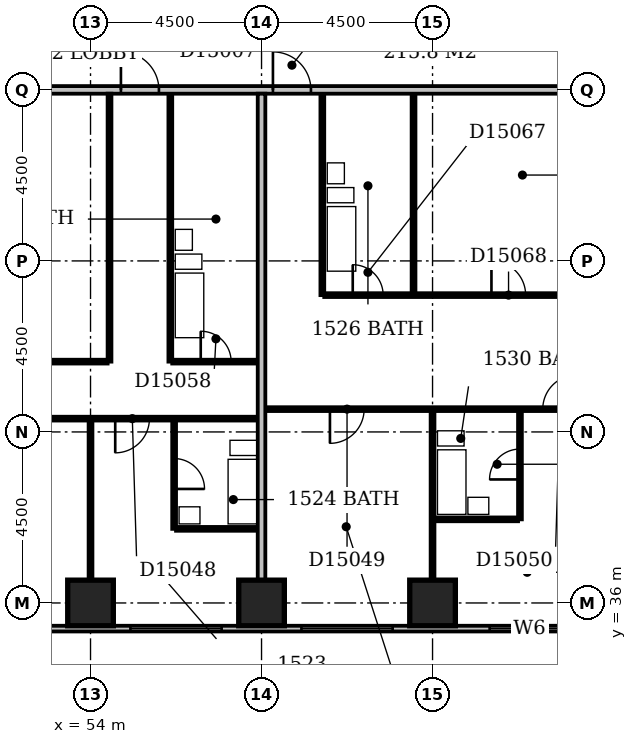
"""IFC4 building model, lengths in metres.
Left out: names, types, materials, properties, quantities, classifications, styles, units other than length and angle.
Written with IfcOpenShell. Run it as: python <this file> out.ifc"""

import sys

from ifc_helpers import new_model, si_unit, direction, frame, frame_2d, origin, origin_2d, place, context, subcontext, project, spatial, rectangle, extrude, element, fill, save


model = new_model("IFC4")
c1 = context("Model", 3, precision=1e-05, world=origin(), true_north=direction((0.0, 1.0)))
c2 = subcontext(c1, "Body", "Model", "MODEL_VIEW")
j1 = project(units=[si_unit("LENGTHUNIT", "METRE"), si_unit("PLANEANGLEUNIT", "RADIAN")], contexts=[c1])
p1 = place(None, origin())
s1 = spatial("IfcSite", under=j1, at=p1, CompositionType="ELEMENT")
p2 = place(p1, origin())
s2 = spatial("IfcBuilding", under=s1, at=p2, CompositionType="ELEMENT")
p3 = place(p2, frame((0.0, 0.0, 65.0)))
s3 = spatial("IfcBuildingStorey", under=s2, at=p3, CompositionType="ELEMENT", Elevation=65.0)
for number, where, z_axis, x_axis in (
    (1, (54.0, 36.0, -0.3), (0.0, 0.0, 1.0), (1.0, 0.0, 0.0)),
    (2, (58.5, 36.0, -0.3), (0.0, 0.0, 1.0), (1.0, 0.0, 0.0)),
    (3, (63.0, 36.0, -0.3), (0.0, 0.0, 1.0), (1.0, 0.0, 0.0)),
):
    element("IfcColumn", number, at=place(p3, frame(where, z_axis=z_axis, x_axis=x_axis)), inside=s3, PredefinedType="COLUMN", context=c2, shape_type="SweptSolid", body=[
        extrude(rectangle(XDim=1.2, YDim=1.2, at=origin_2d()), origin(), (0.0, 0.0, 1.0), 3.6),
    ])
p4 = place(p3, frame((23.1, 35.325, 0.0), z_axis=(0.0, 0.0, 1.0), x_axis=(1.0, 0.0, 0.0)))
e4 = element("IfcWall", 4, at=p4, inside=s3, PredefinedType="STANDARD", context=c2, shape_type="SweptSolid", body=[
    extrude(rectangle(XDim=45.15, YDim=0.15, at=frame_2d((22.575, 0.0))), origin(), (0.0, 0.0, 1.0), 2.7),
])
p5 = place(p4, frame((0.45, 0.0, 0.6)))
e5 = element("IfcOpeningElement", 5, at=p5, cuts=e4, PredefinedType="OPENING", context=c2, shape_type="SweptSolid", body=[
    extrude(rectangle(XDim=2.4, YDim=1.8, at=frame_2d((1.2, 0.9))), frame((0.0, 0.087, 0.0), z_axis=(0.0, -1.0, 0.0), x_axis=(1.0, 0.0, 0.0)), (0.0, 0.0, 1.0), 0.174),
])
p6 = place(p4, frame((4.95, 0.0, 0.6)))
e6 = element("IfcOpeningElement", 6, at=p6, cuts=e4, PredefinedType="OPENING", context=c2, shape_type="SweptSolid", body=[
    extrude(rectangle(XDim=2.4, YDim=1.8, at=frame_2d((1.2, 0.9))), frame((0.0, 0.087, 0.0), z_axis=(0.0, -1.0, 0.0), x_axis=(1.0, 0.0, 0.0)), (0.0, 0.0, 1.0), 0.174),
])
p7 = place(p4, frame((10.877, 0.0, 0.6)))
e7 = element("IfcOpeningElement", 7, at=p7, cuts=e4, PredefinedType="OPENING", context=c2, shape_type="SweptSolid", body=[
    extrude(rectangle(XDim=1.2, YDim=1.8, at=frame_2d((0.6, 0.9))), frame((0.0, 0.087, 0.0), z_axis=(0.0, -1.0, 0.0), x_axis=(1.0, 0.0, 0.0)), (0.0, 0.0, 1.0), 0.174),
])
p8 = place(p4, frame((13.823, 0.0, 0.6)))
e8 = element("IfcOpeningElement", 8, at=p8, cuts=e4, PredefinedType="OPENING", context=c2, shape_type="SweptSolid", body=[
    extrude(rectangle(XDim=1.2, YDim=1.8, at=frame_2d((0.6, 0.9))), frame((0.0, 0.087, 0.0), z_axis=(0.0, -1.0, 0.0), x_axis=(1.0, 0.0, 0.0)), (0.0, 0.0, 1.0), 0.174),
])
p9 = place(p4, frame((18.45, 0.0, 0.6)))
e9 = element("IfcOpeningElement", 9, at=p9, cuts=e4, PredefinedType="OPENING", context=c2, shape_type="SweptSolid", body=[
    extrude(rectangle(XDim=2.4, YDim=1.8, at=frame_2d((1.2, 0.9))), frame((0.0, 0.087, 0.0), z_axis=(0.0, -1.0, 0.0), x_axis=(1.0, 0.0, 0.0)), (0.0, 0.0, 1.0), 0.174),
])
p10 = place(p4, frame((22.95, 0.0, 0.6)))
e10 = element("IfcOpeningElement", 10, at=p10, cuts=e4, PredefinedType="OPENING", context=c2, shape_type="SweptSolid", body=[
    extrude(rectangle(XDim=2.4, YDim=1.8, at=frame_2d((1.2, 0.9))), frame((0.0, 0.087, 0.0), z_axis=(0.0, -1.0, 0.0), x_axis=(1.0, 0.0, 0.0)), (0.0, 0.0, 1.0), 0.174),
])
p11 = place(p4, frame((27.45, 0.0, 0.6)))
e11 = element("IfcOpeningElement", 11, at=p11, cuts=e4, PredefinedType="OPENING", context=c2, shape_type="SweptSolid", body=[
    extrude(rectangle(XDim=2.4, YDim=1.8, at=frame_2d((1.2, 0.9))), frame((0.0, 0.087, 0.0), z_axis=(0.0, -1.0, 0.0), x_axis=(1.0, 0.0, 0.0)), (0.0, 0.0, 1.0), 0.174),
])
p12 = place(p4, frame((31.95, 0.0, 0.6)))
e12 = element("IfcOpeningElement", 12, at=p12, cuts=e4, PredefinedType="OPENING", context=c2, shape_type="SweptSolid", body=[
    extrude(rectangle(XDim=2.4, YDim=1.8, at=frame_2d((1.2, 0.9))), frame((0.0, 0.087, 0.0), z_axis=(0.0, -1.0, 0.0), x_axis=(1.0, 0.0, 0.0)), (0.0, 0.0, 1.0), 0.174),
])
p13 = place(p4, frame((36.45, 0.0, 0.6)))
e13 = element("IfcOpeningElement", 13, at=p13, cuts=e4, PredefinedType="OPENING", context=c2, shape_type="SweptSolid", body=[
    extrude(rectangle(XDim=2.4, YDim=1.8, at=frame_2d((1.2, 0.9))), frame((0.0, 0.087, 0.0), z_axis=(0.0, -1.0, 0.0), x_axis=(1.0, 0.0, 0.0)), (0.0, 0.0, 1.0), 0.174),
])
p14 = place(p4, frame((41.403, 0.0, 0.6)))
e14 = element("IfcOpeningElement", 14, at=p14, cuts=e4, PredefinedType="OPENING", context=c2, shape_type="SweptSolid", body=[
    extrude(rectangle(XDim=2.1, YDim=1.8, at=frame_2d((1.05, 0.9))), frame((0.0, 0.087, 0.0), z_axis=(0.0, -1.0, 0.0), x_axis=(1.0, 0.0, 0.0)), (0.0, 0.0, 1.0), 0.174),
])
p15 = place(p3, frame((54.0, 36.6, 0.0), z_axis=(0.0, 0.0, 1.0), x_axis=(0.0, 1.0, 0.0)))
e15 = element("IfcWall", 15, at=p15, inside=s3, PredefinedType="PARTITIONING", context=c2, shape_type="SweptSolid", body=[
    extrude(rectangle(XDim=4.2, YDim=0.1, at=frame_2d((2.1, 0.0))), origin(), (0.0, 0.0, 1.0), 2.6),
])
p16 = place(p3, frame((58.5, 36.6, 0.0), z_axis=(0.0, 0.0, 1.0), x_axis=(0.0, 1.0, 0.0)))
e16 = element("IfcWall", 16, at=p16, inside=s3, PredefinedType="PARTITIONING", context=c2, shape_type="SweptSolid", body=[
    extrude(rectangle(XDim=12.8, YDim=0.2, at=frame_2d((6.4, 0.0))), origin(), (0.0, 0.0, 1.0), 3.3),
])
p17 = place(p3, frame((63.0, 36.6, 0.0), z_axis=(0.0, 0.0, 1.0), x_axis=(0.0, 1.0, 0.0)))
e17 = element("IfcWall", 17, at=p17, inside=s3, PredefinedType="PARTITIONING", context=c2, shape_type="SweptSolid", body=[
    extrude(rectangle(XDim=4.45, YDim=0.1, at=frame_2d((2.225, 0.0))), origin(), (0.0, 0.0, 1.0), 2.4),
])
p18 = place(p3, frame((56.2, 37.95, 0.0), z_axis=(0.0, 0.0, 1.0), x_axis=(0.0, 1.0, 0.0)))
e18 = element("IfcWall", 18, at=p18, inside=s3, PredefinedType="PLUMBINGWALL", context=c2, shape_type="SweptSolid", body=[
    extrude(rectangle(XDim=2.85, YDim=0.1, at=frame_2d((1.425, 0.0))), origin(), (0.0, 0.0, 1.0), 3.3),
])
p19 = place(p18, frame((1.05, 0.0, 0.0)))
e19 = element("IfcOpeningElement", 19, at=p19, cuts=e18, PredefinedType="OPENING", context=c2, shape_type="SweptSolid", body=[
    extrude(rectangle(XDim=0.8, YDim=2.1, at=frame_2d((0.4, 1.05))), frame((0.0, 0.062, 0.0), z_axis=(0.0, -1.0, 0.0), x_axis=(1.0, 0.0, 0.0)), (0.0, 0.0, 1.0), 0.124),
])
p20 = place(p3, frame((56.25, 37.95, 0.0), z_axis=(0.0, 0.0, 1.0), x_axis=(1.0, 0.0, 0.0)))
e20 = element("IfcWall", 20, at=p20, inside=s3, PredefinedType="PLUMBINGWALL", context=c2, shape_type="SweptSolid", body=[
    extrude(rectangle(XDim=2.15, YDim=0.1, at=frame_2d((1.075, 0.0))), origin(), (0.0, 0.0, 1.0), 3.3),
])
p21 = place(p3, frame((63.05, 38.2, 0.0), z_axis=(0.0, 0.0, 1.0), x_axis=(1.0, 0.0, 0.0)))
e21 = element("IfcWall", 21, at=p21, inside=s3, PredefinedType="PLUMBINGWALL", context=c2, shape_type="SweptSolid", body=[
    extrude(rectangle(XDim=2.2, YDim=0.1, at=frame_2d((1.1, 0.0))), origin(), (0.0, 0.0, 1.0), 3.3),
])
p22 = place(p3, frame((65.3, 38.2, 0.0), z_axis=(0.0, 0.0, 1.0), x_axis=(0.0, 1.0, 0.0)))
e22 = element("IfcWall", 22, at=p22, inside=s3, PredefinedType="PLUMBINGWALL", context=c2, shape_type="SweptSolid", body=[
    extrude(rectangle(XDim=2.85, YDim=0.1, at=frame_2d((1.425, 0.0))), origin(), (0.0, 0.0, 1.0), 3.3),
])
p23 = place(p22, frame((1.05, 0.0, 0.0)))
e23 = element("IfcOpeningElement", 23, at=p23, cuts=e22, PredefinedType="OPENING", context=c2, shape_type="SweptSolid", body=[
    extrude(rectangle(XDim=0.8, YDim=2.1, at=frame_2d((0.4, 1.05))), frame((0.0, 0.062, 0.0), z_axis=(0.0, -1.0, 0.0), x_axis=(1.0, 0.0, 0.0)), (0.0, 0.0, 1.0), 0.124),
])
p24 = place(p3, frame((49.6, 40.85, 0.0), z_axis=(0.0, 0.0, 1.0), x_axis=(1.0, 0.0, 0.0)))
e24 = element("IfcWall", 24, at=p24, inside=s3, PredefinedType="PARTITIONING", context=c2, shape_type="SweptSolid", body=[
    extrude(rectangle(XDim=8.8, YDim=0.1, at=frame_2d((4.4, 0.0))), origin(), (0.0, 0.0, 1.0), 3.3),
])
p25 = place(p24, frame((1.7, 0.0, 0.0)))
e25 = element("IfcOpeningElement", 25, at=p25, cuts=e24, PredefinedType="OPENING", context=c2, shape_type="SweptSolid", body=[
    extrude(rectangle(XDim=0.9, YDim=2.1, at=frame_2d((0.45, 1.05))), frame((0.0, 0.062, 0.0), z_axis=(0.0, -1.0, 0.0), x_axis=(1.0, 0.0, 0.0)), (0.0, 0.0, 1.0), 0.124),
])
p26 = place(p24, frame((5.05, 0.0, 0.0)))
e26 = element("IfcOpeningElement", 26, at=p26, cuts=e24, PredefinedType="OPENING", context=c2, shape_type="SweptSolid", body=[
    extrude(rectangle(XDim=0.9, YDim=2.1, at=frame_2d((0.45, 1.05))), frame((0.0, 0.062, 0.0), z_axis=(0.0, -1.0, 0.0), x_axis=(1.0, 0.0, 0.0)), (0.0, 0.0, 1.0), 0.124),
])
p27 = place(p3, frame((58.6, 41.1, 0.0), z_axis=(0.0, 0.0, 1.0), x_axis=(1.0, 0.0, 0.0)))
e27 = element("IfcWall", 27, at=p27, inside=s3, PredefinedType="PARTITIONING", context=c2, shape_type="SweptSolid", body=[
    extrude(rectangle(XDim=8.3, YDim=0.1, at=frame_2d((4.15, 0.0))), origin(), (0.0, 0.0, 1.0), 3.3),
])
p28 = place(p27, frame((1.7, 0.0, 0.0)))
e28 = element("IfcOpeningElement", 28, at=p28, cuts=e27, PredefinedType="OPENING", context=c2, shape_type="SweptSolid", body=[
    extrude(rectangle(XDim=0.9, YDim=2.1, at=frame_2d((0.45, 1.05))), frame((0.0, 0.062, 0.0), z_axis=(0.0, -1.0, 0.0), x_axis=(1.0, 0.0, 0.0)), (0.0, 0.0, 1.0), 0.124),
])
p29 = place(p27, frame((7.3, 0.0, 0.0)))
e29 = element("IfcOpeningElement", 29, at=p29, cuts=e27, PredefinedType="OPENING", context=c2, shape_type="SweptSolid", body=[
    extrude(rectangle(XDim=0.9, YDim=2.1, at=frame_2d((0.45, 1.05))), frame((0.0, 0.062, 0.0), z_axis=(0.0, -1.0, 0.0), x_axis=(1.0, 0.0, 0.0)), (0.0, 0.0, 1.0), 0.124),
])
p30 = place(p3, frame((49.6, 42.35, 0.0), z_axis=(0.0, 0.0, 1.0), x_axis=(1.0, 0.0, 0.0)))
e30 = element("IfcWall", 30, at=p30, inside=s3, PredefinedType="PARTITIONING", context=c2, shape_type="SweptSolid", body=[
    extrude(rectangle(XDim=4.85, YDim=0.1, at=frame_2d((2.425, 0.0))), origin(), (0.0, 0.0, 1.0), 3.3),
])
p31 = place(p30, frame((1.95, 0.0, 0.0)))
e31 = element("IfcOpeningElement", 31, at=p31, cuts=e30, PredefinedType="OPENING", context=c2, shape_type="SweptSolid", body=[
    extrude(rectangle(XDim=0.9, YDim=2.1, at=frame_2d((0.45, 1.05))), frame((0.0, 0.062, 0.0), z_axis=(0.0, -1.0, 0.0), x_axis=(1.0, 0.0, 0.0)), (0.0, 0.0, 1.0), 0.124),
])
p32 = place(p3, frame((54.5, 42.35, 0.0), z_axis=(0.0, 0.0, 1.0), x_axis=(0.0, 1.0, 0.0)))
e32 = element("IfcWall", 32, at=p32, inside=s3, PredefinedType="PARTITIONING", context=c2, shape_type="SweptSolid", body=[
    extrude(rectangle(XDim=7.05, YDim=0.1, at=frame_2d((3.525, 0.0))), origin(), (0.0, 0.0, 1.0), 2.6),
])
p33 = place(p3, frame((56.1, 42.35, 0.0), z_axis=(0.0, 0.0, 1.0), x_axis=(0.0, 1.0, 0.0)))
e33 = element("IfcWall", 33, at=p33, inside=s3, PredefinedType="PLUMBINGWALL", context=c2, shape_type="SweptSolid", body=[
    extrude(rectangle(XDim=7.05, YDim=0.1, at=frame_2d((3.525, 0.0))), origin(), (0.0, 0.0, 1.0), 3.3),
])
p34 = place(p3, frame((56.15, 42.35, 0.0), z_axis=(0.0, 0.0, 1.0), x_axis=(1.0, 0.0, 0.0)))
e34 = element("IfcWall", 34, at=p34, inside=s3, PredefinedType="PARTITIONING", context=c2, shape_type="SweptSolid", body=[
    extrude(rectangle(XDim=2.25, YDim=0.1, at=frame_2d((1.125, 0.0))), origin(), (0.0, 0.0, 1.0), 3.3),
])
p35 = place(p34, frame((0.75, 0.0, 0.0)))
e35 = element("IfcOpeningElement", 35, at=p35, cuts=e34, PredefinedType="OPENING", context=c2, shape_type="SweptSolid", body=[
    extrude(rectangle(XDim=0.8, YDim=2.1, at=frame_2d((0.4, 1.05))), frame((0.0, 0.062, 0.0), z_axis=(0.0, -1.0, 0.0), x_axis=(1.0, 0.0, 0.0)), (0.0, 0.0, 1.0), 0.124),
])
p36 = place(p3, frame((60.1, 44.1, 0.0), z_axis=(0.0, 0.0, 1.0), x_axis=(0.0, 1.0, 0.0)))
e36 = element("IfcWall", 36, at=p36, inside=s3, PredefinedType="PLUMBINGWALL", context=c2, shape_type="SweptSolid", body=[
    extrude(rectangle(XDim=5.3, YDim=0.1, at=frame_2d((2.65, 0.0))), origin(), (0.0, 0.0, 1.0), 3.3),
])
p37 = place(p3, frame((60.15, 44.1, 0.0), z_axis=(0.0, 0.0, 1.0), x_axis=(1.0, 0.0, 0.0)))
e37 = element("IfcWall", 37, at=p37, inside=s3, PredefinedType="PARTITIONING", context=c2, shape_type="SweptSolid", body=[
    extrude(rectangle(XDim=7.95, YDim=0.1, at=frame_2d((3.975, 0.0))), origin(), (0.0, 0.0, 1.0), 3.3),
])
p38 = place(p37, frame((0.75, 0.0, 0.0)))
e38 = element("IfcOpeningElement", 38, at=p38, cuts=e37, PredefinedType="OPENING", context=c2, shape_type="SweptSolid", body=[
    extrude(rectangle(XDim=0.8, YDim=2.1, at=frame_2d((0.4, 1.05))), frame((0.0, 0.062, 0.0), z_axis=(0.0, -1.0, 0.0), x_axis=(1.0, 0.0, 0.0)), (0.0, 0.0, 1.0), 0.124),
])
p39 = place(p37, frame((4.4, 0.0, 0.0)))
e39 = element("IfcOpeningElement", 39, at=p39, cuts=e37, PredefinedType="OPENING", context=c2, shape_type="SweptSolid", body=[
    extrude(rectangle(XDim=0.9, YDim=2.1, at=frame_2d((0.45, 1.05))), frame((0.0, 0.062, 0.0), z_axis=(0.0, -1.0, 0.0), x_axis=(1.0, 0.0, 0.0)), (0.0, 0.0, 1.0), 0.124),
])
p40 = place(p3, frame((62.5, 44.15, 0.0), z_axis=(0.0, 0.0, 1.0), x_axis=(0.0, 1.0, 0.0)))
e40 = element("IfcWall", 40, at=p40, inside=s3, PredefinedType="PLUMBINGWALL", context=c2, shape_type="SweptSolid", body=[
    extrude(rectangle(XDim=5.25, YDim=0.1, at=frame_2d((2.625, 0.0))), origin(), (0.0, 0.0, 1.0), 2.4),
])
p41 = place(p3, frame((9.1, 49.5, 0.0), z_axis=(0.0, 0.0, 1.0), x_axis=(1.0, 0.0, 0.0)))
e41 = element("IfcWall", 41, at=p41, inside=s3, PredefinedType="PARTITIONING", context=c2, shape_type="SweptSolid", body=[
    extrude(rectangle(XDim=57.8, YDim=0.2, at=frame_2d((28.9, 0.0))), origin(), (0.0, 0.0, 1.0), 3.3),
])
p42 = place(p41, frame((13.7, 0.0, 0.0)))
e42 = element("IfcOpeningElement", 42, at=p42, cuts=e41, PredefinedType="OPENING", context=c2, shape_type="SweptSolid", body=[
    extrude(rectangle(XDim=1.0, YDim=2.1, at=frame_2d((0.5, 1.05))), frame((0.0, 0.112, 0.0), z_axis=(0.0, -1.0, 0.0), x_axis=(1.0, 0.0, 0.0)), (0.0, 0.0, 1.0), 0.224),
])
p43 = place(p41, frame((32.2, 0.0, 0.0)))
e43 = element("IfcOpeningElement", 43, at=p43, cuts=e41, PredefinedType="OPENING", context=c2, shape_type="SweptSolid", body=[
    extrude(rectangle(XDim=1.0, YDim=2.1, at=frame_2d((0.5, 1.05))), frame((0.0, 0.112, 0.0), z_axis=(0.0, -1.0, 0.0), x_axis=(1.0, 0.0, 0.0)), (0.0, 0.0, 1.0), 0.224),
])
p44 = place(p41, frame((37.85, 0.0, 0.0)))
e44 = element("IfcOpeningElement", 44, at=p44, cuts=e41, PredefinedType="OPENING", context=c2, shape_type="SweptSolid", body=[
    extrude(rectangle(XDim=1.0, YDim=2.1, at=frame_2d((0.5, 1.05))), frame((0.0, 0.112, 0.0), z_axis=(0.0, -1.0, 0.0), x_axis=(1.0, 0.0, 0.0)), (0.0, 0.0, 1.0), 0.224),
])
p45 = place(p41, frame((45.7, 0.0, 0.0)))
e45 = element("IfcOpeningElement", 45, at=p45, cuts=e41, PredefinedType="OPENING", context=c2, shape_type="SweptSolid", body=[
    extrude(rectangle(XDim=1.0, YDim=2.1, at=frame_2d((0.5, 1.05))), frame((0.0, 0.112, 0.0), z_axis=(0.0, -1.0, 0.0), x_axis=(1.0, 0.0, 0.0)), (0.0, 0.0, 1.0), 0.224),
])
p46 = place(p41, frame((49.7, 0.0, 0.0)))
e46 = element("IfcOpeningElement", 46, at=p46, cuts=e41, PredefinedType="OPENING", context=c2, shape_type="SweptSolid", body=[
    extrude(rectangle(XDim=1.0, YDim=2.1, at=frame_2d((0.5, 1.05))), frame((0.0, 0.112, 0.0), z_axis=(0.0, -1.0, 0.0), x_axis=(1.0, 0.0, 0.0)), (0.0, 0.0, 1.0), 0.224),
])
p47 = place(p41, frame((8.4, 0.0, 0.0)))
e47 = element("IfcOpeningElement", 47, at=p47, cuts=e41, PredefinedType="OPENING", context=c2, shape_type="SweptSolid", body=[
    extrude(rectangle(XDim=0.9, YDim=2.1, at=frame_2d((0.45, 1.05))), frame((0.0, 0.112, 0.0), z_axis=(0.0, -1.0, 0.0), x_axis=(1.0, 0.0, 0.0)), (0.0, 0.0, 1.0), 0.224),
])
p48 = place(p12, origin())
e48 = element("IfcWindow", 48, at=p48, inside=s3, PartitioningType="SINGLE_PANEL", PredefinedType="WINDOW", context=c2, shape_type="SweptSolid", body=[
    extrude(rectangle(XDim=2.4, YDim=1.8, at=frame_2d((1.2, 0.9))), frame((0.0, 0.03, 0.0), z_axis=(0.0, -1.0, 0.0), x_axis=(1.0, 0.0, 0.0)), (0.0, 0.0, 1.0), 0.06),
])
fill(e12, e48)
p49 = place(p13, origin())
e49 = element("IfcWindow", 49, at=p49, inside=s3, PartitioningType="SINGLE_PANEL", PredefinedType="WINDOW", context=c2, shape_type="SweptSolid", body=[
    extrude(rectangle(XDim=2.4, YDim=1.8, at=frame_2d((1.2, 0.9))), frame((0.0, 0.03, 0.0), z_axis=(0.0, -1.0, 0.0), x_axis=(1.0, 0.0, 0.0)), (0.0, 0.0, 1.0), 0.06),
])
fill(e13, e49)
p50 = place(p14, origin())
e50 = element("IfcWindow", 50, at=p50, inside=s3, PartitioningType="SINGLE_PANEL", PredefinedType="WINDOW", context=c2, shape_type="SweptSolid", body=[
    extrude(rectangle(XDim=2.1, YDim=1.8, at=frame_2d((1.05, 0.9))), frame((0.0, 0.03, 0.0), z_axis=(0.0, -1.0, 0.0), x_axis=(1.0, 0.0, 0.0)), (0.0, 0.0, 1.0), 0.06),
])
fill(e14, e50)
p51 = place(p19, frame((0.8, 0.0, 0.0), z_axis=(0.0, 0.0, 1.0), x_axis=(-1.0, 0.0, 0.0)))
e51 = element("IfcDoor", 51, at=p51, inside=s3, OperationType="SINGLE_SWING_RIGHT", PredefinedType="DOOR", context=c2, shape_type="SweptSolid", body=[
    extrude(rectangle(XDim=0.8, YDim=2.1, at=frame_2d((0.4, 1.05))), frame((0.0, 0.025, 0.0), z_axis=(0.0, -1.0, 0.0), x_axis=(1.0, 0.0, 0.0)), (0.0, 0.0, 1.0), 0.05),
])
fill(e19, e51)
p52 = place(p23, origin())
e52 = element("IfcDoor", 52, at=p52, inside=s3, OperationType="SINGLE_SWING_LEFT", PredefinedType="DOOR", context=c2, shape_type="SweptSolid", body=[
    extrude(rectangle(XDim=0.8, YDim=2.1, at=frame_2d((0.4, 1.05))), frame((0.0, 0.025, 0.0), z_axis=(0.0, -1.0, 0.0), x_axis=(1.0, 0.0, 0.0)), (0.0, 0.0, 1.0), 0.05),
])
fill(e23, e52)
p53 = place(p26, frame((0.9, 0.0, 0.0), z_axis=(0.0, 0.0, 1.0), x_axis=(-1.0, 0.0, 0.0)))
e53 = element("IfcDoor", 53, at=p53, inside=s3, OperationType="SINGLE_SWING_RIGHT", PredefinedType="DOOR", context=c2, shape_type="SweptSolid", body=[
    extrude(rectangle(XDim=0.9, YDim=2.1, at=frame_2d((0.45, 1.05))), frame((0.0, 0.025, 0.0), z_axis=(0.0, -1.0, 0.0), x_axis=(1.0, 0.0, 0.0)), (0.0, 0.0, 1.0), 0.05),
])
fill(e26, e53)
p54 = place(p28, frame((0.9, 0.0, 0.0), z_axis=(0.0, 0.0, 1.0), x_axis=(-1.0, 0.0, 0.0)))
e54 = element("IfcDoor", 54, at=p54, inside=s3, OperationType="SINGLE_SWING_RIGHT", PredefinedType="DOOR", context=c2, shape_type="SweptSolid", body=[
    extrude(rectangle(XDim=0.9, YDim=2.1, at=frame_2d((0.45, 1.05))), frame((0.0, 0.025, 0.0), z_axis=(0.0, -1.0, 0.0), x_axis=(1.0, 0.0, 0.0)), (0.0, 0.0, 1.0), 0.05),
])
fill(e28, e54)
p55 = place(p29, frame((0.9, 0.0, 0.0), z_axis=(0.0, 0.0, 1.0), x_axis=(-1.0, 0.0, 0.0)))
e55 = element("IfcDoor", 55, at=p55, inside=s3, OperationType="SINGLE_SWING_LEFT", PredefinedType="DOOR", context=c2, shape_type="SweptSolid", body=[
    extrude(rectangle(XDim=0.9, YDim=2.1, at=frame_2d((0.45, 1.05))), frame((0.0, 0.025, 0.0), z_axis=(0.0, -1.0, 0.0), x_axis=(1.0, 0.0, 0.0)), (0.0, 0.0, 1.0), 0.05),
])
fill(e29, e55)
p56 = place(p35, origin())
e56 = element("IfcDoor", 56, at=p56, inside=s3, OperationType="SINGLE_SWING_LEFT", PredefinedType="DOOR", context=c2, shape_type="SweptSolid", body=[
    extrude(rectangle(XDim=0.8, YDim=2.1, at=frame_2d((0.4, 1.05))), frame((0.0, 0.025, 0.0), z_axis=(0.0, -1.0, 0.0), x_axis=(1.0, 0.0, 0.0)), (0.0, 0.0, 1.0), 0.05),
])
fill(e35, e56)
p57 = place(p38, origin())
e57 = element("IfcDoor", 57, at=p57, inside=s3, OperationType="SINGLE_SWING_LEFT", PredefinedType="DOOR", context=c2, shape_type="SweptSolid", body=[
    extrude(rectangle(XDim=0.8, YDim=2.1, at=frame_2d((0.4, 1.05))), frame((0.0, 0.025, 0.0), z_axis=(0.0, -1.0, 0.0), x_axis=(1.0, 0.0, 0.0)), (0.0, 0.0, 1.0), 0.05),
])
fill(e38, e57)
p58 = place(p39, origin())
e58 = element("IfcDoor", 58, at=p58, inside=s3, OperationType="SINGLE_SWING_LEFT", PredefinedType="DOOR", context=c2, shape_type="SweptSolid", body=[
    extrude(rectangle(XDim=0.9, YDim=2.1, at=frame_2d((0.45, 1.05))), frame((0.0, 0.025, 0.0), z_axis=(0.0, -1.0, 0.0), x_axis=(1.0, 0.0, 0.0)), (0.0, 0.0, 1.0), 0.05),
])
fill(e39, e58)
p59 = place(p45, origin())
e59 = element("IfcDoor", 59, at=p59, inside=s3, OperationType="SINGLE_SWING_LEFT", PredefinedType="DOOR", context=c2, shape_type="SweptSolid", body=[
    extrude(rectangle(XDim=1.0, YDim=2.1, at=frame_2d((0.5, 1.05))), frame((0.0, 0.025, 0.0), z_axis=(0.0, -1.0, 0.0), x_axis=(1.0, 0.0, 0.0)), (0.0, 0.0, 1.0), 0.05),
])
fill(e45, e59)
p60 = place(p46, origin())
e60 = element("IfcDoor", 60, at=p60, inside=s3, OperationType="SINGLE_SWING_LEFT", PredefinedType="DOOR", context=c2, shape_type="SweptSolid", body=[
    extrude(rectangle(XDim=1.0, YDim=2.1, at=frame_2d((0.5, 1.05))), frame((0.0, 0.025, 0.0), z_axis=(0.0, -1.0, 0.0), x_axis=(1.0, 0.0, 0.0)), (0.0, 0.0, 1.0), 0.05),
])
fill(e46, e60)
save(model, sys.argv[1])
